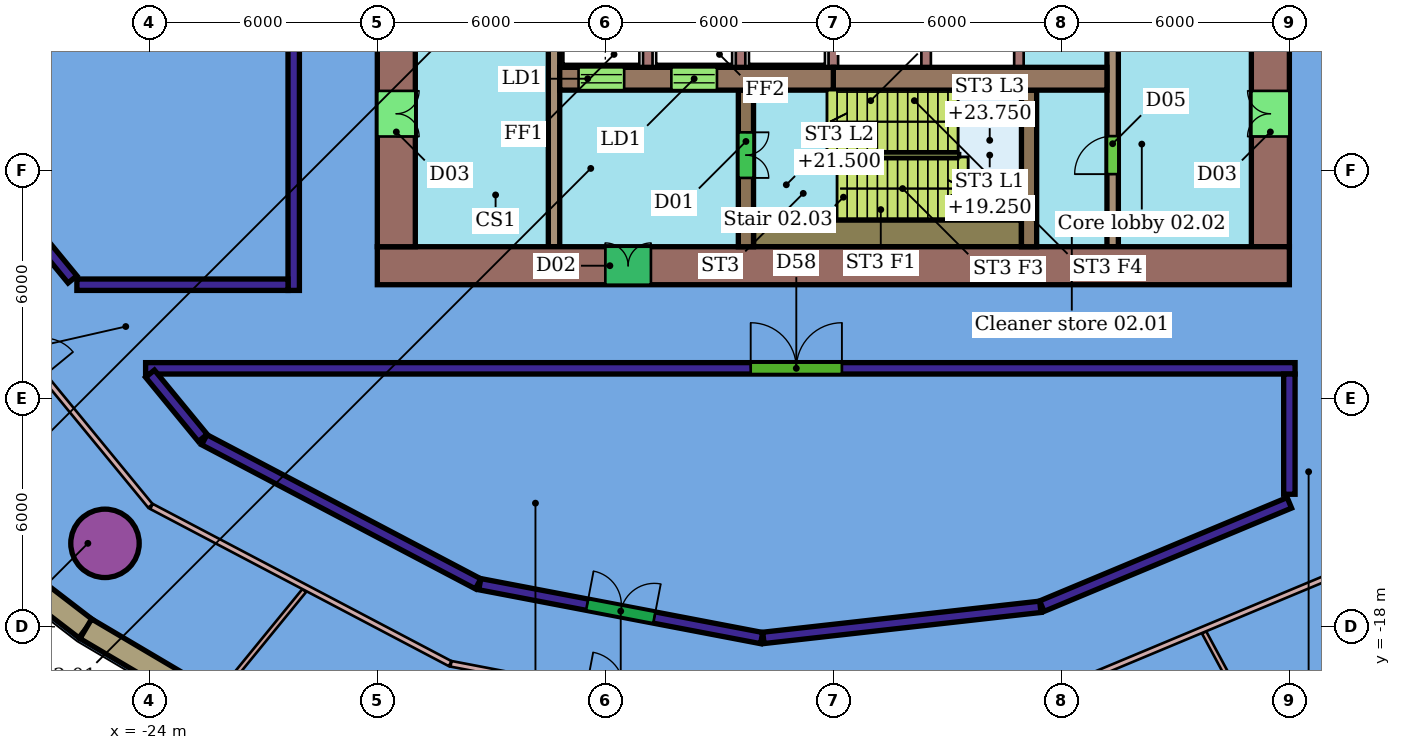
"""IFC4 building model, lengths in metres.
Left out: names, types, materials, properties, quantities, classifications, styles, units other than length and angle.
Written with IfcOpenShell. Run it as: python <this file> out.ifc"""

import sys

from ifc_helpers import new_model, si_unit, direction, frame, frame_2d, origin, origin_2d, place, context, subcontext, project, spatial, rectangle, hollow_circle, extrude, element, fill, save


model = new_model("IFC4")
c1 = context("Model", 3, precision=1e-05, world=origin(), true_north=direction((0.0, 1.0)))
c2 = subcontext(c1, "Body", "Model", "MODEL_VIEW")
j1 = project(units=[si_unit("LENGTHUNIT", "METRE"), si_unit("PLANEANGLEUNIT", "RADIAN")], contexts=[c1])
p1 = place(None, origin())
s1 = spatial("IfcSite", under=j1, at=p1, CompositionType="ELEMENT")
p2 = place(p1, origin())
s2 = spatial("IfcBuilding", under=s1, at=p2, CompositionType="ELEMENT")
p3 = place(p2, frame((0.0, 0.0, 17.0)))
s3 = spatial("IfcBuildingStorey", under=s2, at=p3, CompositionType="ELEMENT", Elevation=17.0)
p4 = place(p3, frame((-25.166, -15.805, 0.0), z_axis=(0.0, 0.0, 1.0), x_axis=(1.0, 0.0, 0.0)))
e1 = element("IfcColumn", 1, at=p4, inside=s3, PredefinedType="COLUMN", context=c2, shape_type="SweptSolid", body=[
    extrude(hollow_circle(Radius=0.9, WallThickness=0.06, at=origin_2d()), origin(), (0.0, 0.0, 1.0), 8.8),
])
p5 = place(p3, frame((-20.2, -9.15, 0.0), z_axis=(0.0, 0.0, 1.0), x_axis=(0.0, 1.0, 0.0)))
e2 = element("IfcWall", 2, at=p5, inside=s3, PredefinedType="PARTITIONING", context=c2, shape_type="SweptSolid", body=[
    extrude(rectangle(XDim=22.255, YDim=0.3, at=frame_2d((11.127, 0.0))), origin(), (0.0, 0.0, 1.0), 8.35),
])
p6 = place(p3, frame((-24.097, -11.2, 0.0), z_axis=(0.0, 0.0, 1.0), x_axis=(1.0, 0.0, 0.0)))
e3 = element("IfcWall", 3, at=p6, inside=s3, PredefinedType="PARTITIONING", context=c2, shape_type="SweptSolid", body=[
    extrude(rectangle(XDim=30.248, YDim=0.3, at=frame_2d((15.124, 0.0))), origin(), (0.0, 0.0, 1.0), 8.35),
])
p7 = place(p6, frame((15.923, 0.0, 0.0)))
e4 = element("IfcOpeningElement", 4, at=p7, cuts=e3, PredefinedType="OPENING", context=c2, shape_type="SweptSolid", body=[
    extrude(rectangle(XDim=2.4, YDim=2.7, at=frame_2d((1.2, 1.35))), frame((0.0, 0.16, 0.0), z_axis=(0.0, -1.0, 0.0), x_axis=(1.0, 0.0, 0.0)), (0.0, 0.0, 1.0), 0.32),
])
p8 = place(p3, frame((6.0, -14.514, 0.0), z_axis=(0.0, 0.0, 1.0), x_axis=(0.0, 1.0, 0.0)))
e5 = element("IfcWall", 5, at=p8, inside=s3, PredefinedType="PARTITIONING", context=c2, shape_type="SweptSolid", body=[
    extrude(rectangle(XDim=3.164, YDim=0.3, at=frame_2d((1.582, 0.0))), origin(), (0.0, 0.0, 1.0), 8.35),
])
p9 = place(p3, frame((-25.906, -9.0, 0.0), z_axis=(0.0, 0.0, 1.0), x_axis=(1.0, 0.0, 0.0)))
e6 = element("IfcWall", 6, at=p9, inside=s3, PredefinedType="PARTITIONING", context=c2, shape_type="SweptSolid", body=[
    extrude(rectangle(XDim=5.556, YDim=0.3, at=frame_2d((2.778, 0.0))), origin(), (0.0, 0.0, 1.0), 8.35),
])
p10 = place(p3, frame((-27.893, -6.582, 0.0), z_axis=(0.0, 0.0, 1.0), x_axis=(0.635004353448, -0.7725085573, 0.0)))
e7 = element("IfcWall", 7, at=p10, inside=s3, PredefinedType="PARTITIONING", context=c2, shape_type="SweptSolid", body=[
    extrude(rectangle(XDim=2.947, YDim=0.3, at=frame_2d((1.474, 0.0))), origin(), (0.0, 0.0, 1.0), 8.35),
])
p11 = place(p3, frame((-23.981, -11.341, 0.0), z_axis=(0.0, 0.0, 1.0), x_axis=(0.635029890501, -0.772487565058, 0.0)))
e8 = element("IfcWall", 8, at=p11, inside=s3, PredefinedType="PARTITIONING", context=c2, shape_type="SweptSolid", body=[
    extrude(rectangle(XDim=2.186, YDim=0.3, at=frame_2d((1.093, 0.0))), origin(), (0.0, 0.0, 1.0), 8.35),
])
p12 = place(p3, frame((-15.303, -16.879, 0.0), z_axis=(0.0, 0.0, 1.0), x_axis=(0.982202179266, -0.18782672612, 0.0)))
e9 = element("IfcWall", 9, at=p12, inside=s3, PredefinedType="PARTITIONING", context=c2, shape_type="SweptSolid", body=[
    extrude(rectangle(XDim=7.551, YDim=0.3, at=frame_2d((3.775, 0.0))), origin(), (0.0, 0.0, 1.0), 8.35),
])
p13 = place(p12, frame((2.875, 0.0, 0.0)))
e10 = element("IfcOpeningElement", 10, at=p13, cuts=e9, PredefinedType="OPENING", context=c2, shape_type="SweptSolid", body=[
    extrude(rectangle(XDim=1.8, YDim=2.4, at=frame_2d((0.9, 1.2))), frame((0.0, 0.16, 0.0), z_axis=(0.0, -1.0, 0.0), x_axis=(1.0, 0.0, 0.0)), (0.0, 0.0, 1.0), 0.32),
])
p14 = place(p3, frame((-22.553, -13.079, 0.0), z_axis=(0.0, 0.0, 1.0), x_axis=(0.884926027541, -0.46573160273, 0.0)))
e11 = element("IfcWall", 11, at=p14, inside=s3, PredefinedType="PARTITIONING", context=c2, shape_type="SweptSolid", body=[
    extrude(rectangle(XDim=8.142, YDim=0.3, at=frame_2d((4.071, 0.0))), origin(), (0.0, 0.0, 1.0), 8.35),
])
p15 = place(p3, frame((-0.513, -17.458, 0.0), z_axis=(0.0, 0.0, 1.0), x_axis=(0.922816768599, 0.385239161552, 0.0)))
e12 = element("IfcWall", 12, at=p15, inside=s3, PredefinedType="PARTITIONING", context=c2, shape_type="SweptSolid", body=[
    extrude(rectangle(XDim=7.058, YDim=0.3, at=frame_2d((3.529, 0.0))), origin(), (0.0, 0.0, 1.0), 8.35),
])
p16 = place(p3, frame((-7.84, -18.292, 0.0), z_axis=(0.0, 0.0, 1.0), x_axis=(0.993760088273, 0.111538724016, 0.0)))
e13 = element("IfcWall", 13, at=p16, inside=s3, PredefinedType="PARTITIONING", context=c2, shape_type="SweptSolid", body=[
    extrude(rectangle(XDim=7.333, YDim=0.3, at=frame_2d((3.666, 0.0))), origin(), (0.0, 0.0, 1.0), 8.35),
])
p17 = place(p3, frame((-22.156, -19.781, 0.0), z_axis=(0.0, 0.0, 1.0), x_axis=(0.63256707517, 0.774505581266, 0.0)))
e14 = element("IfcWall", 14, at=p17, inside=s3, PredefinedType="PARTITIONING", context=c2, shape_type="SweptSolid", body=[
    extrude(rectangle(XDim=3.53, YDim=0.125, at=frame_2d((1.765, 0.0))), origin(), (0.0, 0.0, 1.0), 8.35),
])
p18 = place(p3, frame((3.755, -18.148, 0.0), z_axis=(0.0, 0.0, 1.0), x_axis=(0.473465520946, -0.88081235259, 0.0)))
e15 = element("IfcWall", 15, at=p18, inside=s3, PredefinedType="PARTITIONING", context=c2, shape_type="SweptSolid", body=[
    extrude(rectangle(XDim=7.714, YDim=0.125, at=frame_2d((3.857, 0.0))), origin(), (0.0, 0.0, 1.0), 8.35),
])
p19 = place(p3, frame((-30.06, -7.411, 0.0), z_axis=(0.0, 0.0, 1.0), x_axis=(0.63502168635, -0.772494309277, 0.0)))
e16 = element("IfcWall", 16, at=p19, inside=s3, PredefinedType="PARTITIONING", context=c2, shape_type="SweptSolid", body=[
    extrude(rectangle(XDim=9.59, YDim=0.15, at=frame_2d((4.795, 0.0))), origin(), (0.0, 0.0, 1.0), 8.35),
])
p20 = place(p19, frame((4.168, 0.0, 0.0)))
e17 = element("IfcOpeningElement", 17, at=p20, cuts=e16, PredefinedType="OPENING", context=c2, shape_type="SweptSolid", body=[
    extrude(rectangle(XDim=1.0, YDim=2.1, at=frame_2d((0.5, 1.05))), frame((0.0, 0.085, 0.0), z_axis=(0.0, -1.0, 0.0), x_axis=(1.0, 0.0, 0.0)), (0.0, 0.0, 1.0), 0.17),
])
p21 = place(p3, frame((-23.942, -14.833, 0.0), z_axis=(0.0, 0.0, 1.0), x_axis=(0.884920607371, -0.465741901326, 0.0)))
e18 = element("IfcWall", 18, at=p21, inside=s3, PredefinedType="PARTITIONING", context=c2, shape_type="SweptSolid", body=[
    extrude(rectangle(XDim=8.882, YDim=0.15, at=frame_2d((4.441, 0.0))), origin(), (0.0, 0.0, 1.0), 8.35),
])
p22 = place(p3, frame((-16.06, -18.975, 0.0), z_axis=(0.0, 0.0, 1.0), x_axis=(0.982207009241, -0.187801466976, 0.0)))
e19 = element("IfcWall", 19, at=p22, inside=s3, PredefinedType="PARTITIONING", context=c2, shape_type="SweptSolid", body=[
    extrude(rectangle(XDim=8.234, YDim=0.15, at=frame_2d((4.117, 0.0))), origin(), (0.0, 0.0, 1.0), 8.35),
])
p23 = place(p22, frame((3.617, 0.0, 0.0)))
e20 = element("IfcOpeningElement", 20, at=p23, cuts=e19, PredefinedType="OPENING", context=c2, shape_type="SweptSolid", body=[
    extrude(rectangle(XDim=1.0, YDim=2.1, at=frame_2d((0.5, 1.05))), frame((0.0, 0.085, 0.0), z_axis=(0.0, -1.0, 0.0), x_axis=(1.0, 0.0, 0.0)), (0.0, 0.0, 1.0), 0.17),
])
p24 = place(p3, frame((0.004, -19.626, 0.0), z_axis=(0.0, 0.0, 1.0), x_axis=(0.922818121352, 0.385235921097, 0.0)))
e21 = element("IfcWall", 21, at=p24, inside=s3, PredefinedType="PARTITIONING", context=c2, shape_type="SweptSolid", body=[
    extrude(rectangle(XDim=8.184, YDim=0.15, at=frame_2d((4.092, 0.0))), origin(), (0.0, 0.0, 1.0), 8.35),
])
p25 = place(p3, frame((-28.959, -15.527, 0.0), z_axis=(0.0, 0.0, 1.0), x_axis=(0.793065901338, -0.609135843745, 0.0)))
e22 = element("IfcWall", 22, at=p25, inside=s3, PredefinedType="SOLIDWALL", context=c2, shape_type="SweptSolid", body=[
    extrude(rectangle(XDim=4.147, YDim=0.6, at=frame_2d((2.073, 0.0))), origin(), (0.0, 0.0, 1.0), 8.4),
])
p26 = place(p3, frame((-25.671, -18.053, 0.0), z_axis=(0.0, 0.0, 1.0), x_axis=(0.861017868942, -0.508574703818, 0.0)))
e23 = element("IfcWall", 23, at=p26, inside=s3, PredefinedType="SOLIDWALL", context=c2, shape_type="SweptSolid", body=[
    extrude(rectangle(XDim=4.363, YDim=0.6, at=frame_2d((2.181, 0.0))), origin(), (0.0, 0.0, 1.0), 8.4),
])
p27 = place(p3, frame((-18.0, -8.5, 0.0), z_axis=(0.0, 0.0, 1.0), x_axis=(1.0, 0.0, 0.0)))
e24 = element("IfcWall", 24, at=p27, inside=s3, PredefinedType="SHEAR", context=c2, shape_type="SweptSolid", body=[
    extrude(rectangle(XDim=24.0, YDim=1.0, at=frame_2d((12.0, 0.0))), origin(), (0.0, 0.0, 1.0), 8.7),
])
p28 = place(p27, frame((6.0, 0.0, 0.0)))
e25 = element("IfcOpeningElement", 25, at=p28, cuts=e24, PredefinedType="OPENING", context=c2, shape_type="SweptSolid", body=[
    extrude(rectangle(XDim=1.2, YDim=2.1, at=frame_2d((0.6, 1.05))), frame((0.0, 0.51, 0.0), z_axis=(0.0, -1.0, 0.0), x_axis=(1.0, 0.0, 0.0)), (0.0, 0.0, 1.0), 1.02),
])
p29 = place(p3, frame((-17.5, 8.0, 0.0), z_axis=(0.0, 0.0, 1.0), x_axis=(0.0, -1.0, 0.0)))
e26 = element("IfcWall", 26, at=p29, inside=s3, PredefinedType="SHEAR", context=c2, shape_type="SweptSolid", body=[
    extrude(rectangle(XDim=16.0, YDim=1.0, at=frame_2d((8.0, 0.0))), origin(), (0.0, 0.0, 1.0), 8.7),
])
p30 = place(p29, frame((11.9, 0.0, 0.0)))
e27 = element("IfcOpeningElement", 27, at=p30, cuts=e26, PredefinedType="OPENING", context=c2, shape_type="SweptSolid", body=[
    extrude(rectangle(XDim=1.2, YDim=2.1, at=frame_2d((0.6, 1.05))), frame((0.0, 0.51, 0.0), z_axis=(0.0, -1.0, 0.0), x_axis=(1.0, 0.0, 0.0)), (0.0, 0.0, 1.0), 1.02),
])
p31 = place(p29, frame((2.9, 0.0, 0.0)))
e28 = element("IfcOpeningElement", 28, at=p31, cuts=e26, PredefinedType="OPENING", context=c2, shape_type="SweptSolid", body=[
    extrude(rectangle(XDim=1.2, YDim=2.1, at=frame_2d((0.6, 1.05))), frame((0.0, 0.51, 0.0), z_axis=(0.0, -1.0, 0.0), x_axis=(1.0, 0.0, 0.0)), (0.0, 0.0, 1.0), 1.02),
])
p32 = place(p3, frame((5.5, -8.0, 0.0), z_axis=(0.0, 0.0, 1.0), x_axis=(0.0, 1.0, 0.0)))
e29 = element("IfcWall", 29, at=p32, inside=s3, PredefinedType="SHEAR", context=c2, shape_type="SweptSolid", body=[
    extrude(rectangle(XDim=16.0, YDim=1.0, at=frame_2d((8.0, 0.0))), origin(), (0.0, 0.0, 1.0), 8.7),
])
p33 = place(p32, frame((2.9, 0.0, 0.0)))
e30 = element("IfcOpeningElement", 30, at=p33, cuts=e29, PredefinedType="OPENING", context=c2, shape_type="SweptSolid", body=[
    extrude(rectangle(XDim=1.2, YDim=2.1, at=frame_2d((0.6, 1.05))), frame((0.0, 0.51, 0.0), z_axis=(0.0, -1.0, 0.0), x_axis=(1.0, 0.0, 0.0)), (0.0, 0.0, 1.0), 1.02),
])
p34 = place(p32, frame((11.9, 0.0, 0.0)))
e31 = element("IfcOpeningElement", 31, at=p34, cuts=e29, PredefinedType="OPENING", context=c2, shape_type="SweptSolid", body=[
    extrude(rectangle(XDim=1.2, YDim=2.1, at=frame_2d((0.6, 1.05))), frame((0.0, 0.51, 0.0), z_axis=(0.0, -1.0, 0.0), x_axis=(1.0, 0.0, 0.0)), (0.0, 0.0, 1.0), 1.02),
])
p35 = place(p3, frame((-13.2, -3.58, 0.0), z_axis=(0.0, 0.0, 1.0), x_axis=(1.0, 0.0, 0.0)))
e32 = element("IfcWall", 32, at=p35, inside=s3, PredefinedType="SHEAR", context=c2, shape_type="SweptSolid", body=[
    extrude(rectangle(XDim=7.2, YDim=0.6, at=frame_2d((3.6, 0.0))), origin(), (0.0, 0.0, 1.0), 8.7),
])
p36 = place(p35, frame((0.496, 0.0, 0.0)))
e33 = element("IfcOpeningElement", 33, at=p36, cuts=e32, PredefinedType="OPENING", context=c2, shape_type="SweptSolid", body=[
    extrude(rectangle(XDim=1.2, YDim=2.1, at=frame_2d((0.6, 1.05))), frame((0.0, 0.31, 0.0), z_axis=(0.0, -1.0, 0.0), x_axis=(1.0, 0.0, 0.0)), (0.0, 0.0, 1.0), 0.62),
])
p37 = place(p35, frame((2.938, 0.0, 0.0)))
e34 = element("IfcOpeningElement", 34, at=p37, cuts=e32, PredefinedType="OPENING", context=c2, shape_type="SweptSolid", body=[
    extrude(rectangle(XDim=1.2, YDim=2.1, at=frame_2d((0.6, 1.05))), frame((0.0, 0.31, 0.0), z_axis=(0.0, -1.0, 0.0), x_axis=(1.0, 0.0, 0.0)), (0.0, 0.0, 1.0), 0.62),
])
p38 = place(p3, frame((-6.0, -3.58, 0.0), z_axis=(0.0, 0.0, 1.0), x_axis=(1.0, 0.0, 0.0)))
e35 = element("IfcWall", 35, at=p38, inside=s3, PredefinedType="SHEAR", context=c2, shape_type="SweptSolid", body=[
    extrude(rectangle(XDim=7.2, YDim=0.6, at=frame_2d((3.6, 0.0))), origin(), (0.0, 0.0, 1.0), 8.7),
])
p39 = place(p3, frame((-13.35, 8.0, 0.0), z_axis=(0.0, 0.0, 1.0), x_axis=(0.0, -1.0, 0.0)))
e36 = element("IfcWall", 36, at=p39, inside=s3, PredefinedType="SHEAR", context=c2, shape_type="SweptSolid", body=[
    extrude(rectangle(XDim=16.0, YDim=0.3, at=frame_2d((8.0, 0.0))), origin(), (0.0, 0.0, 1.0), 8.7),
])
p40 = place(p39, frame((7.25, 0.0, 0.0)))
e37 = element("IfcOpeningElement", 37, at=p40, cuts=e36, PredefinedType="OPENING", context=c2, shape_type="SweptSolid", body=[
    extrude(rectangle(XDim=1.5, YDim=2.1, at=frame_2d((0.75, 1.05))), frame((0.0, 0.16, 0.0), z_axis=(0.0, -1.0, 0.0), x_axis=(1.0, 0.0, 0.0)), (0.0, 0.0, 1.0), 0.32),
])
p41 = place(p3, frame((1.35, -8.0, 0.0), z_axis=(0.0, 0.0, 1.0), x_axis=(0.0, 1.0, 0.0)))
e38 = element("IfcWall", 38, at=p41, inside=s3, PredefinedType="SHEAR", context=c2, shape_type="SweptSolid", body=[
    extrude(rectangle(XDim=16.0, YDim=0.3, at=frame_2d((8.0, 0.0))), origin(), (0.0, 0.0, 1.0), 8.7),
])
p42 = place(p41, frame((1.91, 0.0, 0.0)))
e39 = element("IfcOpeningElement", 39, at=p42, cuts=e38, PredefinedType="OPENING", context=c2, shape_type="SweptSolid", body=[
    extrude(rectangle(XDim=1.0, YDim=2.1, at=frame_2d((0.5, 1.05))), frame((0.0, 0.16, 0.0), z_axis=(0.0, -1.0, 0.0), x_axis=(1.0, 0.0, 0.0)), (0.0, 0.0, 1.0), 0.32),
])
p43 = place(p41, frame((7.25, 0.0, 0.0)))
e40 = element("IfcOpeningElement", 40, at=p43, cuts=e38, PredefinedType="OPENING", context=c2, shape_type="SweptSolid", body=[
    extrude(rectangle(XDim=1.5, YDim=2.1, at=frame_2d((0.75, 1.05))), frame((0.0, 0.16, 0.0), z_axis=(0.0, -1.0, 0.0), x_axis=(1.0, 0.0, 0.0)), (0.0, 0.0, 1.0), 0.32),
])
p44 = place(p3, frame((-8.3, -3.88, 0.0), z_axis=(0.0, 0.0, 1.0), x_axis=(0.0, -1.0, 0.0)))
e41 = element("IfcWall", 41, at=p44, inside=s3, PredefinedType="SHEAR", context=c2, shape_type="SweptSolid", body=[
    extrude(rectangle(XDim=4.12, YDim=0.4, at=frame_2d((2.06, 0.0))), origin(), (0.0, 0.0, 1.0), 8.7),
])
p45 = place(p44, frame((1.11, 0.0, 0.0)))
e42 = element("IfcOpeningElement", 42, at=p45, cuts=e41, PredefinedType="OPENING", context=c2, shape_type="SweptSolid", body=[
    extrude(rectangle(XDim=1.2, YDim=2.1, at=frame_2d((0.6, 1.05))), frame((0.0, 0.21, 0.0), z_axis=(0.0, -1.0, 0.0), x_axis=(1.0, 0.0, 0.0)), (0.0, 0.0, 1.0), 0.42),
])
p46 = place(p3, frame((-0.85, -3.88, 0.0), z_axis=(0.0, 0.0, 1.0), x_axis=(0.0, -1.0, 0.0)))
e43 = element("IfcWall", 43, at=p46, inside=s3, PredefinedType="SHEAR", context=c2, shape_type="SweptSolid", body=[
    extrude(rectangle(XDim=4.12, YDim=0.4, at=frame_2d((2.06, 0.0))), origin(), (0.0, 0.0, 1.0), 8.7),
])
p47 = place(p3, frame((-8.1, -7.65, 0.0), z_axis=(0.0, 0.0, 1.0), x_axis=(1.0, 0.0, 0.0)))
e44 = element("IfcWall", 44, at=p47, inside=s3, PredefinedType="SHEAR", context=c2, shape_type="SweptSolid", body=[
    extrude(rectangle(XDim=7.05, YDim=0.7, at=frame_2d((3.525, 0.0))), origin(), (0.0, 0.0, 1.0), 8.7),
])
for number, where, z_axis, x_axis in (
    (45, (-10.883, -1.6, 0.0), (0.0, 0.0, 1.0), (0.0, -1.0, 0.0)),
    (46, (-8.442, -1.6, 0.0), (0.0, 0.0, 1.0), (0.0, -1.0, 0.0)),
    (47, (-6.0, -1.6, 0.0), (0.0, 0.0, 1.0), (0.0, -1.0, 0.0)),
    (48, (-3.558, -1.6, 0.0), (0.0, 0.0, 1.0), (0.0, -1.0, 0.0)),
    (49, (-1.117, -1.6, 0.0), (0.0, 0.0, 1.0), (0.0, -1.0, 0.0)),
):
    element("IfcWall", number, at=place(p3, frame(where, z_axis=z_axis, x_axis=x_axis)), inside=s3, PredefinedType="SHEAR", context=c2, shape_type="SweptSolid", body=[
        extrude(rectangle(XDim=1.68, YDim=0.25, at=frame_2d((0.84, 0.0))), origin(), (0.0, 0.0, 1.0), 8.7),
    ])
p48 = place(p7, origin())
e50 = element("IfcDoor", 50, at=p48, inside=s3, OperationType="DOUBLE_DOOR_SINGLE_SWING", PredefinedType="DOOR", context=c2, shape_type="SweptSolid", body=[
    extrude(rectangle(XDim=2.4, YDim=2.7, at=frame_2d((1.2, 1.35))), frame((0.0, 0.025, 0.0), z_axis=(0.0, -1.0, 0.0), x_axis=(1.0, 0.0, 0.0)), (0.0, 0.0, 1.0), 0.05),
])
fill(e4, e50)
p49 = place(p13, origin())
e51 = element("IfcDoor", 51, at=p49, inside=s3, OperationType="DOUBLE_DOOR_SINGLE_SWING", PredefinedType="DOOR", context=c2, shape_type="SweptSolid", body=[
    extrude(rectangle(XDim=1.8, YDim=2.4, at=frame_2d((0.9, 1.2))), frame((0.0, 0.025, 0.0), z_axis=(0.0, -1.0, 0.0), x_axis=(1.0, 0.0, 0.0)), (0.0, 0.0, 1.0), 0.05),
])
fill(e10, e51)
p50 = place(p28, origin())
e52 = element("IfcDoor", 52, at=p50, inside=s3, OperationType="DOUBLE_DOOR_SINGLE_SWING", PredefinedType="NOTDEFINED", context=c2, shape_type="SweptSolid", body=[
    extrude(rectangle(XDim=1.2, YDim=2.1, at=frame_2d((0.6, 1.05))), frame((0.0, 0.025, 0.0), z_axis=(0.0, -1.0, 0.0), x_axis=(1.0, 0.0, 0.0)), (0.0, 0.0, 1.0), 0.05),
])
fill(e25, e52)
p51 = place(p30, origin())
e53 = element("IfcDoor", 53, at=p51, inside=s3, OperationType="DOUBLE_DOOR_SINGLE_SWING", PredefinedType="NOTDEFINED", context=c2, shape_type="SweptSolid", body=[
    extrude(rectangle(XDim=1.2, YDim=2.1, at=frame_2d((0.6, 1.05))), frame((0.0, 0.025, 0.0), z_axis=(0.0, -1.0, 0.0), x_axis=(1.0, 0.0, 0.0)), (0.0, 0.0, 1.0), 0.05),
])
fill(e27, e53)
p52 = place(p33, origin())
e54 = element("IfcDoor", 54, at=p52, inside=s3, OperationType="DOUBLE_DOOR_SINGLE_SWING", PredefinedType="NOTDEFINED", context=c2, shape_type="SweptSolid", body=[
    extrude(rectangle(XDim=1.2, YDim=2.1, at=frame_2d((0.6, 1.05))), frame((0.0, 0.025, 0.0), z_axis=(0.0, -1.0, 0.0), x_axis=(1.0, 0.0, 0.0)), (0.0, 0.0, 1.0), 0.05),
])
fill(e30, e54)
p53 = place(p36, origin())
e55 = element("IfcDoor", 55, at=p53, inside=s3, OperationType="DOUBLE_DOOR_SLIDING", PredefinedType="NOTDEFINED", context=c2, shape_type="SweptSolid", body=[
    extrude(rectangle(XDim=1.2, YDim=2.1, at=frame_2d((0.6, 1.05))), frame((0.0, 0.025, 0.0), z_axis=(0.0, -1.0, 0.0), x_axis=(1.0, 0.0, 0.0)), (0.0, 0.0, 1.0), 0.05),
])
fill(e33, e55)
p54 = place(p37, origin())
e56 = element("IfcDoor", 56, at=p54, inside=s3, OperationType="DOUBLE_DOOR_SLIDING", PredefinedType="NOTDEFINED", context=c2, shape_type="SweptSolid", body=[
    extrude(rectangle(XDim=1.2, YDim=2.1, at=frame_2d((0.6, 1.05))), frame((0.0, 0.025, 0.0), z_axis=(0.0, -1.0, 0.0), x_axis=(1.0, 0.0, 0.0)), (0.0, 0.0, 1.0), 0.05),
])
fill(e34, e56)
p55 = place(p42, origin())
e57 = element("IfcDoor", 57, at=p55, inside=s3, OperationType="SINGLE_SWING_LEFT", PredefinedType="NOTDEFINED", context=c2, shape_type="SweptSolid", body=[
    extrude(rectangle(XDim=1.0, YDim=2.1, at=frame_2d((0.5, 1.05))), frame((0.0, 0.025, 0.0), z_axis=(0.0, -1.0, 0.0), x_axis=(1.0, 0.0, 0.0)), (0.0, 0.0, 1.0), 0.05),
])
fill(e39, e57)
p56 = place(p45, origin())
e58 = element("IfcDoor", 58, at=p56, inside=s3, OperationType="DOUBLE_DOOR_SINGLE_SWING", PredefinedType="NOTDEFINED", context=c2, shape_type="SweptSolid", body=[
    extrude(rectangle(XDim=1.2, YDim=2.1, at=frame_2d((0.6, 1.05))), frame((0.0, 0.025, 0.0), z_axis=(0.0, -1.0, 0.0), x_axis=(1.0, 0.0, 0.0)), (0.0, 0.0, 1.0), 0.05),
])
fill(e42, e58)
save(model, sys.argv[1])
